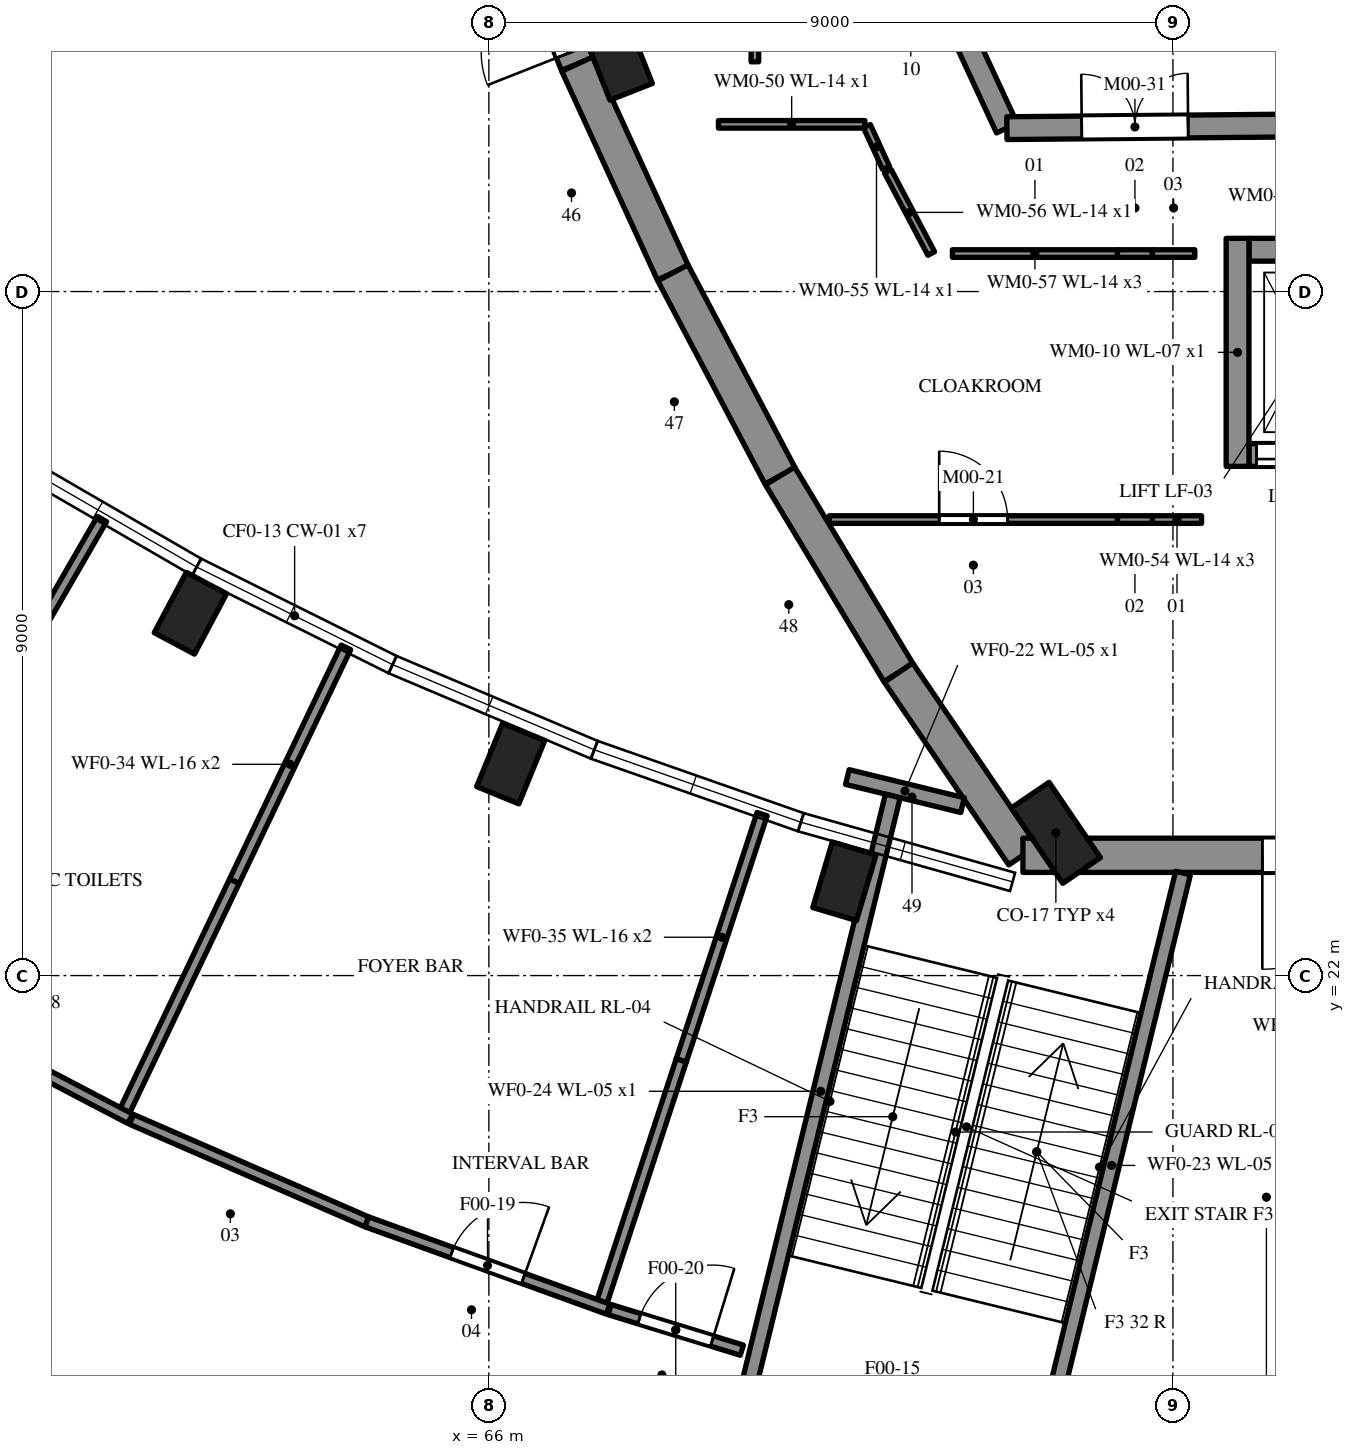
"""IFC4 building model, lengths in metres.
Left out: names, types, materials, properties, quantities, classifications, styles, units other than length and angle.
Written with IfcOpenShell. Run it as: python <this file> out.ifc"""

import sys

from ifc_helpers import new_model, si_unit, direction, frame, frame_2d, origin, origin_2d, place, context, subcontext, project, spatial, rectangle, extrude, element, fill, save


model = new_model("IFC4")
c1 = context("Model", 3, precision=1e-05, world=origin(), true_north=direction((0.0, 1.0)))
c2 = subcontext(c1, "Body", "Model", "MODEL_VIEW")
j1 = project(units=[si_unit("LENGTHUNIT", "METRE"), si_unit("PLANEANGLEUNIT", "RADIAN")], contexts=[c1])
p1 = place(None, origin())
s1 = spatial("IfcSite", under=j1, at=p1, CompositionType="ELEMENT")
p2 = place(p1, origin())
s2 = spatial("IfcBuilding", under=s1, at=p2, CompositionType="ELEMENT")
p3 = place(p2, origin())
s3 = spatial("IfcBuildingStorey", under=s2, at=p3, CompositionType="ELEMENT", Elevation=0.0)
p4 = place(p3, frame((66.153, 36.553, 0.0), z_axis=(0.0, 0.0, 1.0), x_axis=(0.366920100653, -0.930252460215, 0.0)))
e1 = element("IfcWall", 1, at=p4, inside=s3, PredefinedType="SOLIDWALL", context=c2, shape_type="SweptSolid", body=[
    extrude(rectangle(XDim=2.752, YDim=0.45, at=frame_2d((1.376, 0.0))), origin(), (0.0, 0.0, 1.0), 5.4),
])
p5 = place(p4, frame((0.176, 0.0, 0.0)))
e2 = element("IfcOpeningElement", 2, at=p5, cuts=e1, PredefinedType="OPENING", context=c2, shape_type="SweptSolid", body=[
    extrude(rectangle(XDim=2.4, YDim=2.4, at=frame_2d((1.2, 1.2))), frame((0.0, 0.235, 0.0), z_axis=(0.0, -1.0, 0.0), x_axis=(1.0, 0.0, 0.0)), (0.0, 0.0, 1.0), 0.47),
])
p6 = place(p3, frame((67.163, 33.993, 0.0), z_axis=(0.0, 0.0, 1.0), x_axis=(0.416407051835, -0.909178292296, 0.0)))
e3 = element("IfcWall", 3, at=p6, inside=s3, PredefinedType="SOLIDWALL", context=c2, shape_type="SweptSolid", body=[
    extrude(rectangle(XDim=3.021, YDim=0.45, at=frame_2d((1.511, 0.0))), origin(), (0.0, 0.0, 1.0), 5.4),
])
p7 = place(p3, frame((68.421, 31.246, 0.0), z_axis=(0.0, 0.0, 1.0), x_axis=(0.466728769487, -0.884400506407, 0.0)))
e4 = element("IfcWall", 4, at=p7, inside=s3, PredefinedType="SOLIDWALL", context=c2, shape_type="SweptSolid", body=[
    extrude(rectangle(XDim=3.021, YDim=0.45, at=frame_2d((1.51, 0.0))), origin(), (0.0, 0.0, 1.0), 5.4),
])
p8 = place(p3, frame((69.831, 28.575, 0.0), z_axis=(0.0, 0.0, 1.0), x_axis=(0.515636119523, -0.856807675177, 0.0)))
e5 = element("IfcWall", 5, at=p8, inside=s3, PredefinedType="SOLIDWALL", context=c2, shape_type="SweptSolid", body=[
    extrude(rectangle(XDim=3.021, YDim=0.45, at=frame_2d((1.511, 0.0))), origin(), (0.0, 0.0, 1.0), 5.4),
])
p9 = place(p3, frame((71.389, 25.986, 0.0), z_axis=(0.0, 0.0, 1.0), x_axis=(0.5629642644, -0.826481238147, 0.0)))
e6 = element("IfcWall", 6, at=p9, inside=s3, PredefinedType="SOLIDWALL", context=c2, shape_type="SweptSolid", body=[
    extrude(rectangle(XDim=2.908, YDim=0.45, at=frame_2d((1.454, 0.0))), origin(), (0.0, 0.0, 1.0), 5.4),
])
p10 = place(p3, frame((73.026, 23.583, 0.0), z_axis=(0.0, 0.0, 1.0), x_axis=(1.0, 0.0, 0.0)))
e7 = element("IfcWall", 7, at=p10, inside=s3, PredefinedType="SOLIDWALL", context=c2, shape_type="SweptSolid", body=[
    extrude(rectangle(XDim=21.948, YDim=0.45, at=frame_2d((10.974, 0.0))), origin(), (0.0, 0.0, 1.0), 5.4),
])
p11 = place(p10, frame((3.15, 0.0, 0.0)))
e8 = element("IfcOpeningElement", 8, at=p11, cuts=e7, PredefinedType="OPENING", context=c2, shape_type="SweptSolid", body=[
    extrude(rectangle(XDim=3.0, YDim=3.0, at=frame_2d((1.5, 1.5))), frame((0.0, 0.235, 0.0), z_axis=(0.0, -1.0, 0.0), x_axis=(1.0, 0.0, 0.0)), (0.0, 0.0, 1.0), 0.47),
])
p12 = place(p10, frame((6.25, 0.0, 0.0)))
e9 = element("IfcOpeningElement", 9, at=p12, cuts=e7, PredefinedType="OPENING", context=c2, shape_type="SweptSolid", body=[
    extrude(rectangle(XDim=3.0, YDim=3.0, at=frame_2d((1.5, 1.5))), frame((0.0, 0.235, 0.0), z_axis=(0.0, -1.0, 0.0), x_axis=(1.0, 0.0, 0.0)), (0.0, 0.0, 1.0), 0.47),
])
p13 = place(p10, frame((16.2, 0.0, 0.0)))
e10 = element("IfcOpeningElement", 10, at=p13, cuts=e7, PredefinedType="OPENING", context=c2, shape_type="SweptSolid", body=[
    extrude(rectangle(XDim=3.0, YDim=3.0, at=frame_2d((1.5, 1.5))), frame((0.0, 0.235, 0.0), z_axis=(0.0, -1.0, 0.0), x_axis=(1.0, 0.0, 0.0)), (0.0, 0.0, 1.0), 0.47),
])
p14 = place(p3, frame((71.558, 35.865, 0.0), z_axis=(0.0, 0.0, 1.0), x_axis=(0.420315192535, -0.907378167538, 0.0)))
e11 = element("IfcWall", 11, at=p14, inside=s3, PredefinedType="SHEAR", context=c2, shape_type="SweptSolid", body=[
    extrude(rectangle(XDim=2.992, YDim=0.3, at=frame_2d((1.496, 0.0))), origin(), (0.0, 0.0, 1.0), 5.4),
])
p15 = place(p3, frame((72.815, 33.15, 0.0), z_axis=(0.0, 0.0, 1.0), x_axis=(0.999957788763, 0.009188073348, 0.0)))
e12 = element("IfcWall", 12, at=p15, inside=s3, PredefinedType="SHEAR", context=c2, shape_type="SweptSolid", body=[
    extrude(rectangle(XDim=22.479, YDim=0.3, at=frame_2d((11.24, 0.0))), origin(), (0.0, 0.0, 1.0), 5.4),
])
p16 = place(p15, frame((0.985, 0.0, 0.0)))
e13 = element("IfcOpeningElement", 13, at=p16, cuts=e12, PredefinedType="OPENING", context=c2, shape_type="SweptSolid", body=[
    extrude(rectangle(XDim=1.4, YDim=2.1, at=frame_2d((0.7, 1.05))), frame((0.0, 0.16, 0.0), z_axis=(0.0, -1.0, 0.0), x_axis=(1.0, 0.0, 0.0)), (0.0, 0.0, 1.0), 0.32),
])
p17 = place(p15, frame((10.485, 0.0, 0.0)))
e14 = element("IfcOpeningElement", 14, at=p17, cuts=e12, PredefinedType="OPENING", context=c2, shape_type="SweptSolid", body=[
    extrude(rectangle(XDim=1.4, YDim=2.1, at=frame_2d((0.7, 1.05))), frame((0.0, 0.16, 0.0), z_axis=(0.0, -1.0, 0.0), x_axis=(1.0, 0.0, 0.0)), (0.0, 0.0, 1.0), 0.32),
])
p18 = place(p15, frame((19.985, 0.0, 0.0)))
e15 = element("IfcOpeningElement", 15, at=p18, cuts=e12, PredefinedType="OPENING", context=c2, shape_type="SweptSolid", body=[
    extrude(rectangle(XDim=1.4, YDim=2.1, at=frame_2d((0.7, 1.05))), frame((0.0, 0.16, 0.0), z_axis=(0.0, -1.0, 0.0), x_axis=(1.0, 0.0, 0.0)), (0.0, 0.0, 1.0), 0.32),
])
for number, where, z_axis, x_axis in (
    (16, (73.46, 23.878, 0.0), (0.0, 0.0, 1.0), (0.563, -0.826, 0.0)),
    (17, (67.651, 34.186, 0.0), (0.0, 0.0, 1.0), (0.367, -0.93, 0.0)),
):
    element("IfcColumn", number, at=place(p3, frame(where, z_axis=z_axis, x_axis=x_axis)), inside=s3, PredefinedType="PILASTER", context=c2, shape_type="SweptSolid", body=[
        extrude(rectangle(XDim=1.2, YDim=0.6, at=origin_2d()), origin(), (0.0, 0.0, 1.0), 5.4),
    ])
p19 = place(p3, frame((76.0, 28.85, -1.4), z_axis=(0.0, 0.0, 1.0), x_axis=(1.0, 0.0, 0.0)))
e18 = element("IfcWall", 18, at=p19, inside=s3, PredefinedType="SHEAR", context=c2, shape_type="SweptSolid", body=[
    extrude(rectangle(XDim=1.5, YDim=0.3, at=frame_2d((0.75, 0.0))), origin(), (0.0, 0.0, 1.0), 6.8),
])
p20 = place(p19, frame((0.1, 0.0, 1.4)))
e19 = element("IfcOpeningElement", 19, at=p20, cuts=e18, PredefinedType="OPENING", context=c2, shape_type="SweptSolid", body=[
    extrude(rectangle(XDim=1.3, YDim=2.3, at=frame_2d((0.65, 1.15))), frame((0.0, 0.16, 0.0), z_axis=(0.0, -1.0, 0.0), x_axis=(1.0, 0.0, 0.0)), (0.0, 0.0, 1.0), 0.32),
])
p21 = place(p3, frame((77.5, 31.55, -1.4), z_axis=(0.0, 0.0, 1.0), x_axis=(-1.0, 0.0, 0.0)))
e20 = element("IfcWall", 20, at=p21, inside=s3, PredefinedType="SHEAR", context=c2, shape_type="SweptSolid", body=[
    extrude(rectangle(XDim=1.5, YDim=0.3, at=frame_2d((0.75, 0.0))), origin(), (0.0, 0.0, 1.0), 6.8),
])
p22 = place(p3, frame((75.85, 31.7, -1.4), z_axis=(0.0, 0.0, 1.0), x_axis=(0.0, -1.0, 0.0)))
e21 = element("IfcWall", 21, at=p22, inside=s3, PredefinedType="SHEAR", context=c2, shape_type="SweptSolid", body=[
    extrude(rectangle(XDim=3.0, YDim=0.3, at=frame_2d((1.5, 0.0))), origin(), (0.0, 0.0, 1.0), 6.8),
])
for number, where, z_axis, x_axis in (
    (22, (62.073, 26.768, 0.0), (0.0, 0.0, 1.0), (-0.47, -0.883, 0.0)),
    (23, (66.287, 24.79, 0.0), (0.0, 0.0, 1.0), (-0.379, -0.925, 0.0)),
    (24, (70.677, 23.241, 0.0), (0.0, 0.0, 1.0), (-0.285, -0.958, 0.0)),
):
    element("IfcColumn", number, at=place(p3, frame(where, z_axis=z_axis, x_axis=x_axis)), inside=s3, PredefinedType="PILASTER", context=c2, shape_type="SweptSolid", body=[
        extrude(rectangle(XDim=0.9, YDim=0.6, at=origin_2d()), origin(), (0.0, 0.0, 1.0), 5.4),
    ])
p23 = place(p3, frame((69.02, 33.2, 0.0), z_axis=(0.0, 0.0, 1.0), x_axis=(1.0, 0.0, 0.0)))
e25 = element("IfcWall", 25, at=p23, inside=s3, PredefinedType="PARTITIONING", context=c2, shape_type="SweptSolid", body=[
    extrude(rectangle(XDim=1.927, YDim=0.1, at=frame_2d((0.964, 0.0))), origin(), (0.0, 0.0, 1.0), 5.15),
])
p24 = place(p3, frame((69.5, 34.82, 0.0), z_axis=(0.0, 0.0, 1.0), x_axis=(0.0, -1.0, 0.0)))
e26 = element("IfcWall", 26, at=p24, inside=s3, PredefinedType="PARTITIONING", context=c2, shape_type="SweptSolid", body=[
    extrude(rectangle(XDim=0.797, YDim=0.1, at=frame_2d((0.398, 0.0))), origin(), (0.0, 0.0, 1.0), 5.15),
])
p25 = place(p3, frame((75.377, 28.0, 0.0), z_axis=(0.0, 0.0, 1.0), x_axis=(-1.0, 0.0, 0.0)))
e27 = element("IfcWall", 27, at=p25, inside=s3, PredefinedType="PARTITIONING", context=c2, shape_type="SweptSolid", body=[
    extrude(rectangle(XDim=0.647, YDim=0.1, at=frame_2d((0.323, 0.0))), origin(), (0.0, 0.0, 1.0), 5.15),
])
p26 = place(p3, frame((74.73, 28.0, 0.0), z_axis=(0.0, 0.0, 1.0), x_axis=(-1.0, 0.0, 0.0)))
e28 = element("IfcWall", 28, at=p26, inside=s3, PredefinedType="PARTITIONING", context=c2, shape_type="SweptSolid", body=[
    extrude(rectangle(XDim=0.46, YDim=0.1, at=frame_2d((0.23, 0.0))), origin(), (0.0, 0.0, 1.0), 4.32),
])
p27 = place(p3, frame((74.27, 28.0, 0.0), z_axis=(0.0, 0.0, 1.0), x_axis=(-1.0, 0.0, 0.0)))
e29 = element("IfcWall", 29, at=p27, inside=s3, PredefinedType="PARTITIONING", context=c2, shape_type="SweptSolid", body=[
    extrude(rectangle(XDim=3.791, YDim=0.1, at=frame_2d((1.896, 0.0))), origin(), (0.0, 0.0, 1.0), 5.15),
])
p28 = place(p27, frame((1.445, 0.0, 0.0)))
e30 = element("IfcOpeningElement", 30, at=p28, cuts=e29, PredefinedType="OPENING", context=c2, shape_type="SweptSolid", body=[
    extrude(rectangle(XDim=0.9, YDim=2.1, at=frame_2d((0.45, 1.05))), frame((0.0, 0.06, 0.0), z_axis=(0.0, -1.0, 0.0), x_axis=(1.0, 0.0, 0.0)), (0.0, 0.0, 1.0), 0.12),
])
p29 = place(p3, frame((70.974, 33.177, 0.0), z_axis=(0.0, 0.0, 1.0), x_axis=(0.416055955945, -0.909339013527, 0.0)))
e31 = element("IfcWall", 31, at=p29, inside=s3, PredefinedType="PARTITIONING", context=c2, shape_type="SweptSolid", body=[
    extrude(rectangle(XDim=0.604, YDim=0.1, at=frame_2d((0.302, 0.0))), origin(), (0.0, 0.0, 1.0), 5.15),
])
p30 = place(p3, frame((71.249, 32.583, 0.0), z_axis=(0.0, 0.0, 1.0), x_axis=(0.466970962101, -0.884272650575, 0.0)))
e32 = element("IfcWall", 32, at=p30, inside=s3, PredefinedType="PARTITIONING", context=c2, shape_type="SweptSolid", body=[
    extrude(rectangle(XDim=1.224, YDim=0.1, at=frame_2d((0.612, 0.0))), origin(), (0.0, 0.0, 1.0), 5.15),
])
p31 = place(p3, frame((72.098, 31.5, 0.0), z_axis=(0.0, 0.0, 1.0), x_axis=(1.0, 0.0, 0.0)))
e33 = element("IfcWall", 33, at=p31, inside=s3, PredefinedType="PARTITIONING", context=c2, shape_type="SweptSolid", body=[
    extrude(rectangle(XDim=2.172, YDim=0.1, at=frame_2d((1.086, 0.0))), origin(), (0.0, 0.0, 1.0), 5.15),
])
p32 = place(p3, frame((74.27, 31.5, 0.0), z_axis=(0.0, 0.0, 1.0), x_axis=(1.0, 0.0, 0.0)))
e34 = element("IfcWall", 34, at=p32, inside=s3, PredefinedType="PARTITIONING", context=c2, shape_type="SweptSolid", body=[
    extrude(rectangle(XDim=0.46, YDim=0.1, at=frame_2d((0.23, 0.0))), origin(), (0.0, 0.0, 1.0), 4.32),
])
p33 = place(p3, frame((74.73, 31.5, 0.0), z_axis=(0.0, 0.0, 1.0), x_axis=(1.0, 0.0, 0.0)))
e35 = element("IfcWall", 35, at=p33, inside=s3, PredefinedType="PARTITIONING", context=c2, shape_type="SweptSolid", body=[
    extrude(rectangle(XDim=0.558, YDim=0.1, at=frame_2d((0.279, 0.0))), origin(), (0.0, 0.0, 1.0), 5.15),
])
p34 = place(p3, frame((72.232, 24.242, 0.0), z_axis=(0.0, 0.0, 1.0), x_axis=(-0.971444715638, 0.237266020446, 0.0)))
e36 = element("IfcWall", 36, at=p34, inside=s3, PredefinedType="SHEAR", context=c2, shape_type="SweptSolid", body=[
    extrude(rectangle(XDim=1.56, YDim=0.2, at=frame_2d((0.78, 0.0))), origin(), (0.0, 0.0, 1.0), 5.4),
])
p35 = place(p3, frame((73.255, 15.655, 0.0), z_axis=(0.0, 0.0, 1.0), x_axis=(0.237142809453, 0.971474800458, 0.0)))
e37 = element("IfcWall", 37, at=p35, inside=s3, PredefinedType="SHEAR", context=c2, shape_type="SweptSolid", body=[
    extrude(rectangle(XDim=7.92, YDim=0.2, at=frame_2d((3.96, 0.0))), origin(), (0.0, 0.0, 1.0), 5.4),
])
p36 = place(p3, frame((69.417, 16.592, 0.0), z_axis=(0.0, 0.0, 1.0), x_axis=(0.2371535898, 0.971472168847, 0.0)))
e38 = element("IfcWall", 38, at=p36, inside=s3, PredefinedType="SHEAR", context=c2, shape_type="SweptSolid", body=[
    extrude(rectangle(XDim=8.0, YDim=0.2, at=frame_2d((4.0, 0.0))), origin(), (0.0, 0.0, 1.0), 5.4),
])
p37 = place(p3, frame((60.91, 28.007, 0.0), z_axis=(0.0, 0.0, 1.0), x_axis=(-0.499966231165, -0.866044899352, 0.0)))
e39 = element("IfcWall", 39, at=p37, inside=s3, PredefinedType="PARTITIONING", context=c2, shape_type="SweptSolid", body=[
    extrude(rectangle(XDim=3.41, YDim=0.14, at=frame_2d((1.705, 0.0))), origin(), (0.0, 0.0, 1.0), 5.18),
])
p38 = place(p3, frame((64.119, 26.319, 0.0), z_axis=(0.0, 0.0, 1.0), x_axis=(-0.430497650431, -0.90259169782, 0.0)))
e40 = element("IfcWall", 40, at=p38, inside=s3, PredefinedType="PARTITIONING", context=c2, shape_type="SweptSolid", body=[
    extrude(rectangle(XDim=3.41, YDim=0.14, at=frame_2d((1.705, 0.0))), origin(), (0.0, 0.0, 1.0), 5.18),
])
p39 = place(p3, frame((62.651, 23.241, 0.0), z_axis=(0.0, 0.0, 1.0), x_axis=(-0.430519112568, -0.902581460985, 0.0)))
e41 = element("IfcWall", 41, at=p39, inside=s3, PredefinedType="PARTITIONING", context=c2, shape_type="SweptSolid", body=[
    extrude(rectangle(XDim=3.35, YDim=0.14, at=frame_2d((1.675, 0.0))), origin(), (0.0, 0.0, 1.0), 5.18),
])
p40 = place(p3, frame((69.595, 24.124, 0.0), z_axis=(0.0, 0.0, 1.0), x_axis=(-0.311928968211, -0.950105425093, 0.0)))
e42 = element("IfcWall", 42, at=p40, inside=s3, PredefinedType="PARTITIONING", context=c2, shape_type="SweptSolid", body=[
    extrude(rectangle(XDim=3.41, YDim=0.14, at=frame_2d((1.705, 0.0))), origin(), (0.0, 0.0, 1.0), 5.18),
])
p41 = place(p3, frame((68.531, 20.884, 0.0), z_axis=(0.0, 0.0, 1.0), x_axis=(-0.311917422886, -0.950109215459, 0.0)))
e43 = element("IfcWall", 43, at=p41, inside=s3, PredefinedType="PARTITIONING", context=c2, shape_type="SweptSolid", body=[
    extrude(rectangle(XDim=3.35, YDim=0.14, at=frame_2d((1.675, 0.0))), origin(), (0.0, 0.0, 1.0), 5.18),
])
p42 = place(p3, frame((57.61, 22.037, 0.0), z_axis=(0.0, 0.0, 1.0), x_axis=(0.886024097767, -0.463639189646, 0.0)))
e44 = element("IfcWall", 44, at=p42, inside=s3, PredefinedType="PARTITIONING", context=c2, shape_type="SweptSolid", body=[
    extrude(rectangle(XDim=4.143, YDim=0.14, at=frame_2d((2.071, 0.0))), origin(), (0.0, 0.0, 1.0), 5.18),
])
p43 = place(p42, frame((1.621, 0.0, 0.0)))
e45 = element("IfcOpeningElement", 45, at=p43, cuts=e44, PredefinedType="OPENING", context=c2, shape_type="SweptSolid", body=[
    extrude(rectangle(XDim=0.9, YDim=2.1, at=frame_2d((0.45, 1.05))), frame((0.0, 0.08, 0.0), z_axis=(0.0, -1.0, 0.0), x_axis=(1.0, 0.0, 0.0)), (0.0, 0.0, 1.0), 0.16),
])
p44 = place(p3, frame((61.299, 20.108, 0.0), z_axis=(0.0, 0.0, 1.0), x_axis=(0.916806621588, -0.399331464592, 0.0)))
e46 = element("IfcWall", 46, at=p44, inside=s3, PredefinedType="PARTITIONING", context=c2, shape_type="SweptSolid", body=[
    extrude(rectangle(XDim=3.377, YDim=0.14, at=frame_2d((1.688, 0.0))), origin(), (0.0, 0.0, 1.0), 5.18),
])
p45 = place(p3, frame((64.395, 18.76, 0.0), z_axis=(0.0, 0.0, 1.0), x_axis=(0.940374749463, -0.340140163128, 0.0)))
e47 = element("IfcWall", 47, at=p45, inside=s3, PredefinedType="PARTITIONING", context=c2, shape_type="SweptSolid", body=[
    extrude(rectangle(XDim=3.376, YDim=0.14, at=frame_2d((1.688, 0.0))), origin(), (0.0, 0.0, 1.0), 5.18),
])
p46 = place(p45, frame((1.188, 0.0, 0.0)))
e48 = element("IfcOpeningElement", 48, at=p46, cuts=e47, PredefinedType="OPENING", context=c2, shape_type="SweptSolid", body=[
    extrude(rectangle(XDim=1.0, YDim=2.1, at=frame_2d((0.5, 1.05))), frame((0.0, 0.08, 0.0), z_axis=(0.0, -1.0, 0.0), x_axis=(1.0, 0.0, 0.0)), (0.0, 0.0, 1.0), 0.16),
])
p47 = place(p3, frame((67.589, 17.605, 0.0), z_axis=(0.0, 0.0, 1.0), x_axis=(0.956028130963, -0.293274978148, 0.0)))
e49 = element("IfcWall", 49, at=p47, inside=s3, PredefinedType="PARTITIONING", context=c2, shape_type="SweptSolid", body=[
    extrude(rectangle(XDim=1.82, YDim=0.14, at=frame_2d((0.91, 0.0))), origin(), (0.0, 0.0, 1.0), 5.18),
])
p48 = place(p47, frame((0.41, 0.0, 0.0)))
e50 = element("IfcOpeningElement", 50, at=p48, cuts=e49, PredefinedType="OPENING", context=c2, shape_type="SweptSolid", body=[
    extrude(rectangle(XDim=1.0, YDim=2.1, at=frame_2d((0.5, 1.05))), frame((0.0, 0.08, 0.0), z_axis=(0.0, -1.0, 0.0), x_axis=(1.0, 0.0, 0.0)), (0.0, 0.0, 1.0), 0.16),
])
p49 = place(p20, origin())
e51 = element("IfcDoor", 51, at=p49, inside=s3, OperationType="SLIDING_TO_LEFT", PredefinedType="DOOR", context=c2, shape_type="SweptSolid", body=[
    extrude(rectangle(XDim=1.3, YDim=2.3, at=frame_2d((0.65, 1.15))), frame((0.0, 0.025, 0.0), z_axis=(0.0, -1.0, 0.0), x_axis=(1.0, 0.0, 0.0)), (0.0, 0.0, 1.0), 0.05),
])
fill(e19, e51)
p50 = place(p11, frame((3.0, 0.0, 0.0), z_axis=(0.0, 0.0, 1.0), x_axis=(-1.0, 0.0, 0.0)))
e52 = element("IfcDoor", 52, at=p50, inside=s3, OperationType="DOUBLE_DOOR_SINGLE_SWING", PredefinedType="DOOR", context=c2, shape_type="SweptSolid", body=[
    extrude(rectangle(XDim=3.0, YDim=3.0, at=frame_2d((1.5, 1.5))), frame((0.0, 0.025, 0.0), z_axis=(0.0, -1.0, 0.0), x_axis=(1.0, 0.0, 0.0)), (0.0, 0.0, 1.0), 0.05),
])
fill(e8, e52)
p51 = place(p5, frame((2.4, 0.0, 0.0), z_axis=(0.0, 0.0, 1.0), x_axis=(-1.0, 0.0, 0.0)))
e53 = element("IfcDoor", 53, at=p51, inside=s3, OperationType="DOUBLE_DOOR_SINGLE_SWING", PredefinedType="DOOR", context=c2, shape_type="SweptSolid", body=[
    extrude(rectangle(XDim=2.4, YDim=2.4, at=frame_2d((1.2, 1.2))), frame((0.0, 0.025, 0.0), z_axis=(0.0, -1.0, 0.0), x_axis=(1.0, 0.0, 0.0)), (0.0, 0.0, 1.0), 0.05),
])
fill(e2, e53)
p52 = place(p28, frame((0.9, 0.0, 0.0), z_axis=(0.0, 0.0, 1.0), x_axis=(-1.0, 0.0, 0.0)))
e54 = element("IfcDoor", 54, at=p52, inside=s3, OperationType="SINGLE_SWING_LEFT", PredefinedType="DOOR", context=c2, shape_type="SweptSolid", body=[
    extrude(rectangle(XDim=0.9, YDim=2.1, at=frame_2d((0.45, 1.05))), frame((0.0, 0.025, 0.0), z_axis=(0.0, -1.0, 0.0), x_axis=(1.0, 0.0, 0.0)), (0.0, 0.0, 1.0), 0.05),
])
fill(e30, e54)
p53 = place(p16, origin())
e55 = element("IfcDoor", 55, at=p53, inside=s3, OperationType="DOUBLE_DOOR_SINGLE_SWING", PredefinedType="DOOR", context=c2, shape_type="SweptSolid", body=[
    extrude(rectangle(XDim=1.4, YDim=2.1, at=frame_2d((0.7, 1.05))), frame((0.0, 0.025, 0.0), z_axis=(0.0, -1.0, 0.0), x_axis=(1.0, 0.0, 0.0)), (0.0, 0.0, 1.0), 0.05),
])
fill(e13, e55)
p54 = place(p46, origin())
e56 = element("IfcDoor", 56, at=p54, inside=s3, OperationType="SINGLE_SWING_RIGHT", PredefinedType="DOOR", context=c2, shape_type="SweptSolid", body=[
    extrude(rectangle(XDim=1.0, YDim=2.1, at=frame_2d((0.5, 1.05))), frame((0.0, 0.025, 0.0), z_axis=(0.0, -1.0, 0.0), x_axis=(1.0, 0.0, 0.0)), (0.0, 0.0, 1.0), 0.05),
])
fill(e48, e56)
p55 = place(p48, origin())
e57 = element("IfcDoor", 57, at=p55, inside=s3, OperationType="SINGLE_SWING_RIGHT", PredefinedType="DOOR", context=c2, shape_type="SweptSolid", body=[
    extrude(rectangle(XDim=1.0, YDim=2.1, at=frame_2d((0.5, 1.05))), frame((0.0, 0.025, 0.0), z_axis=(0.0, -1.0, 0.0), x_axis=(1.0, 0.0, 0.0)), (0.0, 0.0, 1.0), 0.05),
])
fill(e50, e57)
save(model, sys.argv[1])
